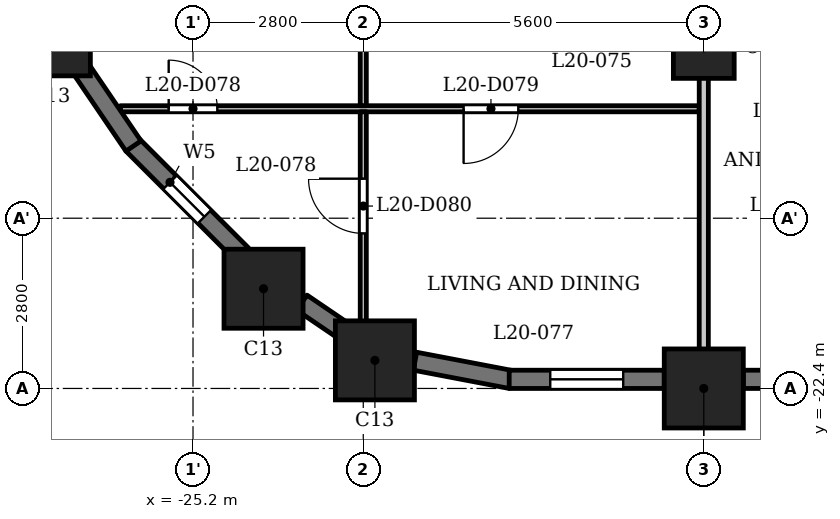
"""IFC4 building model, lengths in metres.
Left out: names, types, materials, properties, quantities, classifications, styles, units other than length and angle.
Written with IfcOpenShell. Run it as: python <this file> out.ifc"""

import sys

from ifc_helpers import new_model, si_unit, direction, frame, frame_2d, origin, origin_2d, place, context, subcontext, project, spatial, rectangle, extrude, element, fill, save


model = new_model("IFC4")
c1 = context("Model", 3, precision=1e-05, world=origin(), true_north=direction((0.0, 1.0)))
c2 = subcontext(c1, "Body", "Model", "MODEL_VIEW")
j1 = project(units=[si_unit("LENGTHUNIT", "METRE"), si_unit("PLANEANGLEUNIT", "RADIAN")], contexts=[c1])
p1 = place(None, origin())
s1 = spatial("IfcSite", under=j1, at=p1, CompositionType="ELEMENT")
p2 = place(p1, origin())
s2 = spatial("IfcBuilding", under=s1, at=p2, CompositionType="ELEMENT")
p3 = place(p2, frame((0.0, 0.0, 83.3)))
s3 = spatial("IfcBuildingStorey", under=s2, at=p3, CompositionType="ELEMENT", Elevation=83.3)
for number, where, z_axis, x_axis in (
    (1, (-22.209, -21.938, 0.0), (0.0, 0.0, 1.0), (1.0, 0.0, 0.0)),
    (2, (-16.8, -22.4, 0.0), (0.0, 0.0, 1.0), (1.0, 0.0, 0.0)),
    (3, (-27.538, -16.609, 0.0), (0.0, 0.0, 1.0), (1.0, 0.0, 0.0)),
    (4, (-24.04, -20.76, 0.0), (0.0, 0.0, 1.0), (1.0, 0.0, 0.0)),
):
    element("IfcColumn", number, at=place(p3, frame(where, z_axis=z_axis, x_axis=x_axis)), inside=s3, PredefinedType="COLUMN", context=c2, shape_type="SweptSolid", body=[
        extrude(rectangle(XDim=1.3, YDim=1.3, at=origin_2d()), origin(), (0.0, 0.0, 1.0), 3.5),
    ])
p4 = place(p3, frame((-16.8, -16.8, 0.0), z_axis=(0.0, 0.0, 1.0), x_axis=(1.0, 0.0, 0.0)))
e5 = element("IfcColumn", 5, at=p4, inside=s3, PredefinedType="COLUMN", context=c2, shape_type="SweptSolid", body=[
    extrude(rectangle(XDim=1.0, YDim=1.0, at=origin_2d()), origin(), (0.0, 0.0, 1.0), 3.5),
])
p5 = place(p3, frame((-26.197, -18.391, 0.0), z_axis=(0.0, 0.0, 1.0), x_axis=(0.707058908279, -0.707154650853, 0.0)))
e6 = element("IfcWall", 6, at=p5, inside=s3, PredefinedType="SOLIDWALL", context=c2, shape_type="SweptSolid", body=[
    extrude(rectangle(XDim=2.55, YDim=0.3, at=frame_2d((1.275, 0.0))), origin(), (0.0, 0.0, 1.0), 2.4),
])
p6 = place(p5, frame((0.875, 0.0, 0.6)))
e7 = element("IfcOpeningElement", 7, at=p6, cuts=e6, PredefinedType="OPENING", context=c2, shape_type="SweptSolid", body=[
    extrude(rectangle(XDim=0.8, YDim=1.55, at=frame_2d((0.4, 0.775))), frame((0.0, 0.16, 0.0), z_axis=(0.0, -1.0, 0.0), x_axis=(1.0, 0.0, 0.0)), (0.0, 0.0, 1.0), 0.32),
])
p7 = place(p3, frame((-23.41, -20.989, 0.0), z_axis=(0.0, 0.0, 1.0), x_axis=(0.827050703543, -0.562127328787, 0.0)))
e8 = element("IfcWall", 8, at=p7, inside=s3, PredefinedType="SOLIDWALL", context=c2, shape_type="SweptSolid", body=[
    extrude(rectangle(XDim=0.877, YDim=0.3, at=frame_2d((0.438, 0.0))), origin(), (0.0, 0.0, 1.0), 3.2),
])
p8 = place(p3, frame((-21.55, -21.952, 0.0), z_axis=(0.0, 0.0, 1.0), x_axis=(0.982278644094, -0.187426426519, 0.0)))
e9 = element("IfcWall", 9, at=p8, inside=s3, PredefinedType="SOLIDWALL", context=c2, shape_type="SweptSolid", body=[
    extrude(rectangle(XDim=1.606, YDim=0.3, at=frame_2d((0.803, 0.0))), origin(), (0.0, 0.0, 1.0), 2.4),
])
p9 = place(p3, frame((-20.0, -22.25, 0.0), z_axis=(0.0, 0.0, 1.0), x_axis=(1.0, 0.0, 0.0)))
e10 = element("IfcWall", 10, at=p9, inside=s3, PredefinedType="SOLIDWALL", context=c2, shape_type="SweptSolid", body=[
    extrude(rectangle(XDim=2.55, YDim=0.3, at=frame_2d((1.275, 0.0))), origin(), (0.0, 0.0, 1.0), 2.4),
])
p10 = place(p9, frame((0.675, 0.0, 0.6)))
e11 = element("IfcOpeningElement", 11, at=p10, cuts=e10, PredefinedType="OPENING", context=c2, shape_type="SweptSolid", body=[
    extrude(rectangle(XDim=1.2, YDim=1.55, at=frame_2d((0.6, 0.775))), frame((0.0, 0.16, 0.0), z_axis=(0.0, -1.0, 0.0), x_axis=(1.0, 0.0, 0.0)), (0.0, 0.0, 1.0), 0.32),
])
p11 = place(p3, frame((-16.15, -22.25, 0.0), z_axis=(0.0, 0.0, 1.0), x_axis=(1.0, 0.0, 0.0)))
e12 = element("IfcWall", 12, at=p11, inside=s3, PredefinedType="SOLIDWALL", context=c2, shape_type="SweptSolid", body=[
    extrude(rectangle(XDim=4.3, YDim=0.3, at=frame_2d((2.15, 0.0))), origin(), (0.0, 0.0, 1.0), 2.4),
])
p12 = place(p11, frame((0.538, 0.0, 0.6)))
e13 = element("IfcOpeningElement", 13, at=p12, cuts=e12, PredefinedType="OPENING", context=c2, shape_type="SweptSolid", body=[
    extrude(rectangle(XDim=1.2, YDim=1.55, at=frame_2d((0.6, 0.775))), frame((0.0, 0.16, 0.0), z_axis=(0.0, -1.0, 0.0), x_axis=(1.0, 0.0, 0.0)), (0.0, 0.0, 1.0), 0.32),
])
p13 = place(p11, frame((2.762, 0.0, 0.6)))
e14 = element("IfcOpeningElement", 14, at=p13, cuts=e12, PredefinedType="OPENING", context=c2, shape_type="SweptSolid", body=[
    extrude(rectangle(XDim=1.2, YDim=1.55, at=frame_2d((0.6, 0.775))), frame((0.0, 0.16, 0.0), z_axis=(0.0, -1.0, 0.0), x_axis=(1.0, 0.0, 0.0)), (0.0, 0.0, 1.0), 0.32),
])
p14 = place(p3, frame((-27.082, -17.084, 0.0), z_axis=(0.0, 0.0, 1.0), x_axis=(0.562010605531, -0.827130025613, 0.0)))
e15 = element("IfcWall", 15, at=p14, inside=s3, PredefinedType="SOLIDWALL", context=c2, shape_type="SweptSolid", body=[
    extrude(rectangle(XDim=1.606, YDim=0.3, at=frame_2d((0.803, 0.0))), origin(), (0.0, 0.0, 1.0), 2.4),
])
p15 = place(p3, frame((-26.394, -17.8, 0.0), z_axis=(0.0, 0.0, 1.0), x_axis=(1.0, 0.0, 0.0)))
e16 = element("IfcWall", 16, at=p15, inside=s3, PredefinedType="PARTITIONING", context=c2, shape_type="SweptSolid", body=[
    extrude(rectangle(XDim=9.519, YDim=0.1, at=frame_2d((4.76, 0.0))), origin(), (0.0, 0.0, 1.0), 3.2),
])
p16 = place(p15, frame((0.794, 0.0, 0.0)))
e17 = element("IfcOpeningElement", 17, at=p16, cuts=e16, PredefinedType="OPENING", context=c2, shape_type="SweptSolid", body=[
    extrude(rectangle(XDim=0.8, YDim=2.1, at=frame_2d((0.4, 1.05))), frame((0.0, 0.06, 0.0), z_axis=(0.0, -1.0, 0.0), x_axis=(1.0, 0.0, 0.0)), (0.0, 0.0, 1.0), 0.12),
])
p17 = place(p15, frame((5.644, 0.0, 0.0)))
e18 = element("IfcOpeningElement", 18, at=p17, cuts=e16, PredefinedType="OPENING", context=c2, shape_type="SweptSolid", body=[
    extrude(rectangle(XDim=0.9, YDim=2.1, at=frame_2d((0.45, 1.05))), frame((0.0, 0.06, 0.0), z_axis=(0.0, -1.0, 0.0), x_axis=(1.0, 0.0, 0.0)), (0.0, 0.0, 1.0), 0.12),
])
p18 = place(p3, frame((-22.4, -21.72, 0.0), z_axis=(0.0, 0.0, 1.0), x_axis=(0.0, 1.0, 0.0)))
e19 = element("IfcWall", 19, at=p18, inside=s3, PredefinedType="PARTITIONING", context=c2, shape_type="SweptSolid", body=[
    extrude(rectangle(XDim=3.87, YDim=0.1, at=frame_2d((1.935, 0.0))), origin(), (0.0, 0.0, 1.0), 3.2),
])
p19 = place(p18, frame((1.87, 0.0, 0.0)))
e20 = element("IfcOpeningElement", 20, at=p19, cuts=e19, PredefinedType="OPENING", context=c2, shape_type="SweptSolid", body=[
    extrude(rectangle(XDim=0.9, YDim=2.1, at=frame_2d((0.45, 1.05))), frame((0.0, 0.06, 0.0), z_axis=(0.0, -1.0, 0.0), x_axis=(1.0, 0.0, 0.0)), (0.0, 0.0, 1.0), 0.12),
])
p20 = place(p3, frame((-22.4, -17.75, 0.0), z_axis=(0.0, 0.0, 1.0), x_axis=(0.0, 1.0, 0.0)))
e21 = element("IfcWall", 21, at=p20, inside=s3, PredefinedType="PARTITIONING", context=c2, shape_type="SweptSolid", body=[
    extrude(rectangle(XDim=2.275, YDim=0.1, at=frame_2d((1.137, 0.0))), origin(), (0.0, 0.0, 1.0), 3.2),
])
p21 = place(p3, frame((-16.8, -23.03, 0.0), z_axis=(0.0, 0.0, 1.0), x_axis=(0.0, 1.0, 0.0)))
e22 = element("IfcWall", 22, at=p21, inside=s3, PredefinedType="PARTITIONING", context=c2, shape_type="SweptSolid", body=[
    extrude(rectangle(XDim=7.555, YDim=0.15, at=frame_2d((3.777, 0.0))), origin(), (0.0, 0.0, 1.0), 3.2),
])
p22 = place(p16, origin())
e23 = element("IfcDoor", 23, at=p22, inside=s3, OperationType="SINGLE_SWING_RIGHT", PredefinedType="DOOR", context=c2, shape_type="SweptSolid", body=[
    extrude(rectangle(XDim=0.8, YDim=2.1, at=frame_2d((0.4, 1.05))), frame((0.0, 0.025, 0.0), z_axis=(0.0, -1.0, 0.0), x_axis=(1.0, 0.0, 0.0)), (0.0, 0.0, 1.0), 0.05),
])
fill(e17, e23)
p23 = place(p17, origin())
e24 = element("IfcDoor", 24, at=p23, inside=s3, OperationType="SINGLE_SWING_LEFT", PredefinedType="DOOR", context=c2, shape_type="SweptSolid", body=[
    extrude(rectangle(XDim=0.9, YDim=2.1, at=frame_2d((0.45, 1.05))), frame((0.0, 0.025, 0.0), z_axis=(0.0, -1.0, 0.0), x_axis=(1.0, 0.0, 0.0)), (0.0, 0.0, 1.0), 0.05),
])
fill(e18, e24)
p24 = place(p19, origin())
e25 = element("IfcDoor", 25, at=p24, inside=s3, OperationType="SINGLE_SWING_LEFT", PredefinedType="DOOR", context=c2, shape_type="SweptSolid", body=[
    extrude(rectangle(XDim=0.9, YDim=2.1, at=frame_2d((0.45, 1.05))), frame((0.0, 0.025, 0.0), z_axis=(0.0, -1.0, 0.0), x_axis=(1.0, 0.0, 0.0)), (0.0, 0.0, 1.0), 0.05),
])
fill(e20, e25)
p25 = place(p6, origin())
e26 = element("IfcWindow", 26, at=p25, inside=s3, PartitioningType="SINGLE_PANEL", PredefinedType="WINDOW", context=c2, shape_type="SweptSolid", body=[
    extrude(rectangle(XDim=0.8, YDim=1.55, at=frame_2d((0.4, 0.775))), frame((0.0, 0.03, 0.0), z_axis=(0.0, -1.0, 0.0), x_axis=(1.0, 0.0, 0.0)), (0.0, 0.0, 1.0), 0.06),
])
fill(e7, e26)
p26 = place(p10, origin())
e27 = element("IfcWindow", 27, at=p26, inside=s3, PartitioningType="SINGLE_PANEL", PredefinedType="WINDOW", context=c2, shape_type="SweptSolid", body=[
    extrude(rectangle(XDim=1.2, YDim=1.55, at=frame_2d((0.6, 0.775))), frame((0.0, 0.03, 0.0), z_axis=(0.0, -1.0, 0.0), x_axis=(1.0, 0.0, 0.0)), (0.0, 0.0, 1.0), 0.06),
])
fill(e11, e27)
save(model, sys.argv[1])
